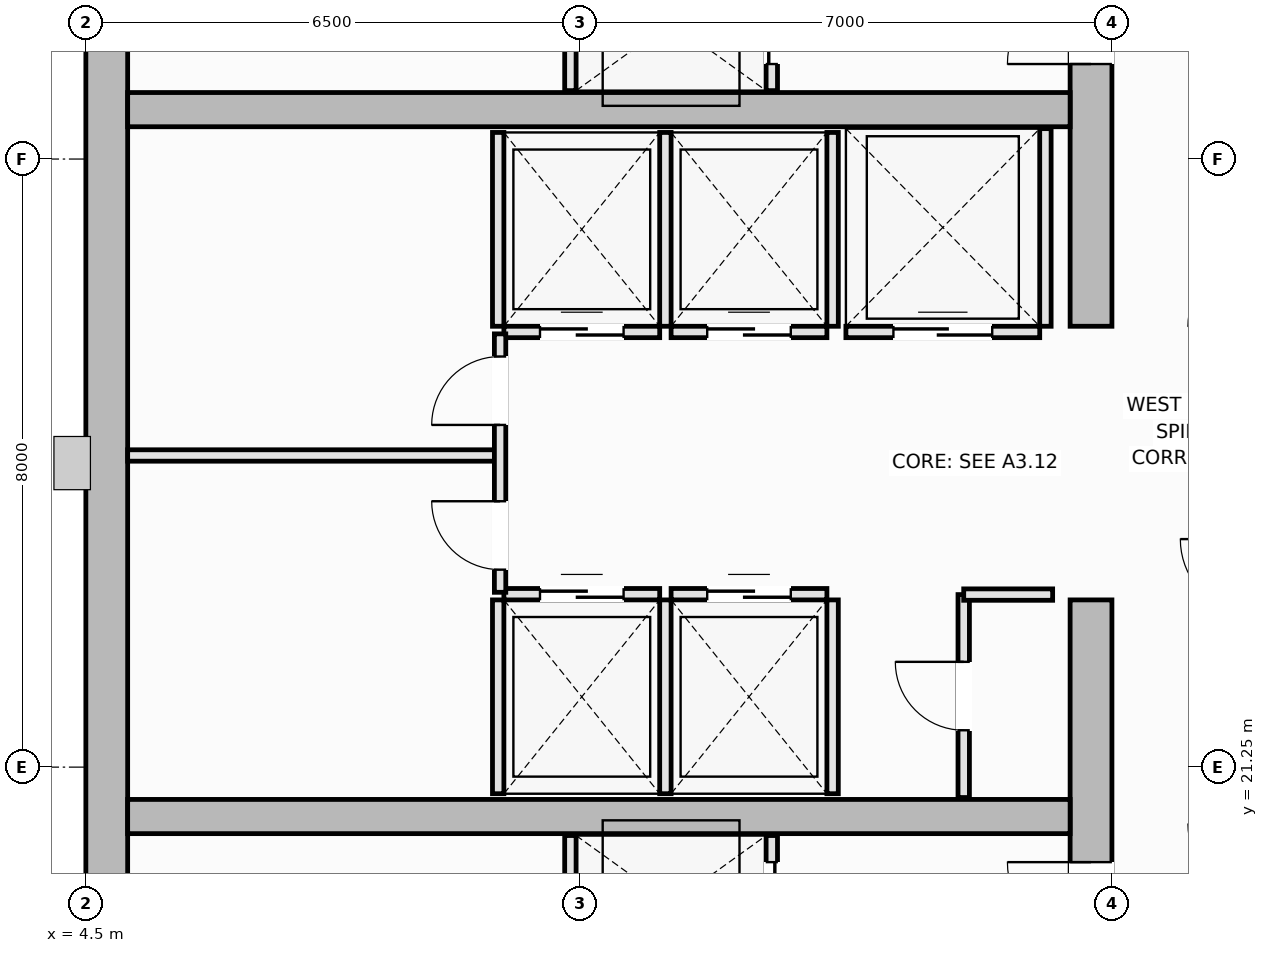
"""IFC4 building model, lengths in metres.
Left out: names, types, materials, properties, quantities, classifications, styles, units other than length and angle.
Written with IfcOpenShell. Run it as: python <this file> out.ifc"""

import sys

from ifc_helpers import new_model, si_unit, direction, frame, frame_2d, origin, place, context, subcontext, project, spatial, rectangle, extrude, element, fill, save


model = new_model("IFC4")
c1 = context("Model", 3, precision=1e-05, world=origin(), true_north=direction((0.0, 1.0)))
c2 = subcontext(c1, "Body", "Model", "MODEL_VIEW")
j1 = project(units=[si_unit("LENGTHUNIT", "METRE"), si_unit("PLANEANGLEUNIT", "RADIAN")], contexts=[c1])
p1 = place(None, origin())
s1 = spatial("IfcSite", under=j1, at=p1, CompositionType="ELEMENT")
p2 = place(p1, origin())
s2 = spatial("IfcBuilding", under=s1, at=p2, CompositionType="ELEMENT")
p3 = place(p2, frame((0.0, 0.0, 234.2)))
s3 = spatial("IfcBuildingStorey", under=s2, at=p3, CompositionType="ELEMENT", Elevation=234.2)
p4 = place(p3, frame((4.775, 14.55, 0.0), z_axis=(0.0, 0.0, 1.0), x_axis=(0.0, 1.0, 0.0)))
e1 = element("IfcWall", 1, at=p4, inside=s3, PredefinedType="SHEAR", context=c2, shape_type="SweptSolid", body=[
    extrude(rectangle(XDim=21.4, YDim=0.55, at=frame_2d((10.7, 0.0))), origin(), (0.0, 0.0, 1.0), 3.55),
])
p5 = place(p3, frame((17.725, 14.55, 0.0), z_axis=(0.0, 0.0, 1.0), x_axis=(0.0, 1.0, 0.0)))
e2 = element("IfcWall", 2, at=p5, inside=s3, PredefinedType="SHEAR", context=c2, shape_type="SweptSolid", body=[
    extrude(rectangle(XDim=8.9, YDim=0.55, at=frame_2d((4.45, 0.0))), origin(), (0.0, 0.0, 1.0), 3.55),
])
p6 = place(p5, frame((4.35, 0.0, 0.0)))
e3 = element("IfcOpeningElement", 3, at=p6, cuts=e2, PredefinedType="OPENING", context=c2, shape_type="SweptSolid", body=[
    extrude(rectangle(XDim=1.1, YDim=2.15, at=frame_2d((0.55, 1.075))), frame((0.0, 0.285, 0.0), z_axis=(0.0, -1.0, 0.0), x_axis=(1.0, 0.0, 0.0)), (0.0, 0.0, 1.0), 0.57),
])
p7 = place(p3, frame((17.725, 27.05, 0.0), z_axis=(0.0, 0.0, 1.0), x_axis=(0.0, 1.0, 0.0)))
e4 = element("IfcWall", 4, at=p7, inside=s3, PredefinedType="SHEAR", context=c2, shape_type="SweptSolid", body=[
    extrude(rectangle(XDim=8.9, YDim=0.55, at=frame_2d((4.45, 0.0))), origin(), (0.0, 0.0, 1.0), 3.55),
])
p8 = place(p7, frame((3.45, 0.0, 0.0)))
e5 = element("IfcOpeningElement", 5, at=p8, cuts=e4, PredefinedType="OPENING", context=c2, shape_type="SweptSolid", body=[
    extrude(rectangle(XDim=1.1, YDim=2.15, at=frame_2d((0.55, 1.075))), frame((0.0, 0.285, 0.0), z_axis=(0.0, -1.0, 0.0), x_axis=(1.0, 0.0, 0.0)), (0.0, 0.0, 1.0), 0.57),
])
for number, where, z_axis, x_axis in (
    (6, (5.05, 20.6, 0.0), (0.0, 0.0, 1.0), (1.0, 0.0, 0.0)),
    (7, (5.05, 29.9, 0.0), (0.0, 0.0, 1.0), (1.0, 0.0, 0.0)),
):
    element("IfcWall", number, at=place(p3, frame(where, z_axis=z_axis, x_axis=x_axis)), inside=s3, PredefinedType="SHEAR", context=c2, shape_type="SweptSolid", body=[
        extrude(rectangle(XDim=12.4, YDim=0.45, at=frame_2d((6.2, 0.0))), origin(), (0.0, 0.0, 1.0), 3.55),
    ])
p9 = place(p3, frame((10.0, 23.525, 0.0), z_axis=(0.0, 0.0, 1.0), x_axis=(1.0, 0.0, 0.0)))
e8 = element("IfcWall", 8, at=p9, inside=s3, PredefinedType="PARTITIONING", context=c2, shape_type="SweptSolid", body=[
    extrude(rectangle(XDim=2.05, YDim=0.15, at=frame_2d((1.025, 0.0))), origin(), (0.0, 0.0, 1.0), 3.37),
])
p10 = place(p9, frame((0.475, 0.0, 0.0)))
e9 = element("IfcOpeningElement", 9, at=p10, cuts=e8, PredefinedType="OPENING", context=c2, shape_type="SweptSolid", body=[
    extrude(rectangle(XDim=1.1, YDim=2.2, at=frame_2d((0.55, 1.1))), frame((0.0, 0.085, 0.0), z_axis=(0.0, -1.0, 0.0), x_axis=(1.0, 0.0, 0.0)), (0.0, 0.0, 1.0), 0.17),
])
for number, where, z_axis, x_axis in (
    (10, (9.925, 20.9, 0.0), (0.0, 0.0, 1.0), (0.0, 1.0, 0.0)),
    (11, (12.125, 20.9, 0.0), (0.0, 0.0, 1.0), (0.0, 1.0, 0.0)),
):
    element("IfcWall", number, at=place(p3, frame(where, z_axis=z_axis, x_axis=x_axis)), inside=s3, PredefinedType="PARTITIONING", context=c2, shape_type="SweptSolid", body=[
        extrude(rectangle(XDim=2.55, YDim=0.15, at=frame_2d((1.275, 0.0))), origin(), (0.0, 0.0, 1.0), 3.37),
    ])
p11 = place(p3, frame((12.2, 23.525, 0.0), z_axis=(0.0, 0.0, 1.0), x_axis=(1.0, 0.0, 0.0)))
e12 = element("IfcWall", 12, at=p11, inside=s3, PredefinedType="PARTITIONING", context=c2, shape_type="SweptSolid", body=[
    extrude(rectangle(XDim=2.05, YDim=0.15, at=frame_2d((1.025, 0.0))), origin(), (0.0, 0.0, 1.0), 3.37),
])
p12 = place(p11, frame((0.475, 0.0, 0.0)))
e13 = element("IfcOpeningElement", 13, at=p12, cuts=e12, PredefinedType="OPENING", context=c2, shape_type="SweptSolid", body=[
    extrude(rectangle(XDim=1.1, YDim=2.2, at=frame_2d((0.55, 1.1))), frame((0.0, 0.085, 0.0), z_axis=(0.0, -1.0, 0.0), x_axis=(1.0, 0.0, 0.0)), (0.0, 0.0, 1.0), 0.17),
])
p13 = place(p3, frame((14.325, 20.9, 0.0), z_axis=(0.0, 0.0, 1.0), x_axis=(0.0, 1.0, 0.0)))
e14 = element("IfcWall", 14, at=p13, inside=s3, PredefinedType="PARTITIONING", context=c2, shape_type="SweptSolid", body=[
    extrude(rectangle(XDim=2.55, YDim=0.15, at=frame_2d((1.275, 0.0))), origin(), (0.0, 0.0, 1.0), 3.37),
])
p14 = place(p3, frame((10.0, 26.975, 0.0), z_axis=(0.0, 0.0, 1.0), x_axis=(1.0, 0.0, 0.0)))
e15 = element("IfcWall", 15, at=p14, inside=s3, PredefinedType="PARTITIONING", context=c2, shape_type="SweptSolid", body=[
    extrude(rectangle(XDim=2.05, YDim=0.15, at=frame_2d((1.025, 0.0))), origin(), (0.0, 0.0, 1.0), 3.37),
])
p15 = place(p14, frame((0.475, 0.0, 0.0)))
e16 = element("IfcOpeningElement", 16, at=p15, cuts=e15, PredefinedType="OPENING", context=c2, shape_type="SweptSolid", body=[
    extrude(rectangle(XDim=1.1, YDim=2.2, at=frame_2d((0.55, 1.1))), frame((0.0, 0.085, 0.0), z_axis=(0.0, -1.0, 0.0), x_axis=(1.0, 0.0, 0.0)), (0.0, 0.0, 1.0), 0.17),
])
for number, where, z_axis, x_axis in (
    (17, (9.925, 27.05, 0.0), (0.0, 0.0, 1.0), (0.0, 1.0, 0.0)),
    (18, (12.125, 27.05, 0.0), (0.0, 0.0, 1.0), (0.0, 1.0, 0.0)),
):
    element("IfcWall", number, at=place(p3, frame(where, z_axis=z_axis, x_axis=x_axis)), inside=s3, PredefinedType="PARTITIONING", context=c2, shape_type="SweptSolid", body=[
        extrude(rectangle(XDim=2.55, YDim=0.15, at=frame_2d((1.275, 0.0))), origin(), (0.0, 0.0, 1.0), 3.37),
    ])
p16 = place(p3, frame((12.2, 26.975, 0.0), z_axis=(0.0, 0.0, 1.0), x_axis=(1.0, 0.0, 0.0)))
e19 = element("IfcWall", 19, at=p16, inside=s3, PredefinedType="PARTITIONING", context=c2, shape_type="SweptSolid", body=[
    extrude(rectangle(XDim=2.05, YDim=0.15, at=frame_2d((1.025, 0.0))), origin(), (0.0, 0.0, 1.0), 3.37),
])
p17 = place(p16, frame((0.475, 0.0, 0.0)))
e20 = element("IfcOpeningElement", 20, at=p17, cuts=e19, PredefinedType="OPENING", context=c2, shape_type="SweptSolid", body=[
    extrude(rectangle(XDim=1.1, YDim=2.2, at=frame_2d((0.55, 1.1))), frame((0.0, 0.085, 0.0), z_axis=(0.0, -1.0, 0.0), x_axis=(1.0, 0.0, 0.0)), (0.0, 0.0, 1.0), 0.17),
])
p18 = place(p3, frame((14.325, 27.05, 0.0), z_axis=(0.0, 0.0, 1.0), x_axis=(0.0, 1.0, 0.0)))
e21 = element("IfcWall", 21, at=p18, inside=s3, PredefinedType="PARTITIONING", context=c2, shape_type="SweptSolid", body=[
    extrude(rectangle(XDim=2.55, YDim=0.15, at=frame_2d((1.275, 0.0))), origin(), (0.0, 0.0, 1.0), 3.37),
])
p19 = place(p3, frame((14.5, 26.975, 0.0), z_axis=(0.0, 0.0, 1.0), x_axis=(1.0, 0.0, 0.0)))
e22 = element("IfcWall", 22, at=p19, inside=s3, PredefinedType="PARTITIONING", context=c2, shape_type="SweptSolid", body=[
    extrude(rectangle(XDim=2.55, YDim=0.15, at=frame_2d((1.275, 0.0))), origin(), (0.0, 0.0, 1.0), 3.37),
])
p20 = place(p19, frame((0.625, 0.0, 0.0)))
e23 = element("IfcOpeningElement", 23, at=p20, cuts=e22, PredefinedType="OPENING", context=c2, shape_type="SweptSolid", body=[
    extrude(rectangle(XDim=1.3, YDim=2.2, at=frame_2d((0.65, 1.1))), frame((0.0, 0.085, 0.0), z_axis=(0.0, -1.0, 0.0), x_axis=(1.0, 0.0, 0.0)), (0.0, 0.0, 1.0), 0.17),
])
p21 = place(p3, frame((17.125, 27.05, 0.0), z_axis=(0.0, 0.0, 1.0), x_axis=(0.0, 1.0, 0.0)))
e24 = element("IfcWall", 24, at=p21, inside=s3, PredefinedType="PARTITIONING", context=c2, shape_type="SweptSolid", body=[
    extrude(rectangle(XDim=2.6, YDim=0.15, at=frame_2d((1.3, 0.0))), origin(), (0.0, 0.0, 1.0), 3.37),
])
p22 = place(p3, frame((10.875, 18.55, 0.0), z_axis=(0.0, 0.0, 1.0), x_axis=(0.0, 1.0, 0.0)))
e25 = element("IfcWall", 25, at=p22, inside=s3, PredefinedType="PARTITIONING", context=c2, shape_type="SweptSolid", body=[
    extrude(rectangle(XDim=1.8, YDim=0.15, at=frame_2d((0.9, 0.0))), origin(), (0.0, 0.0, 1.0), 3.37),
])
p23 = place(p3, frame((13.525, 18.55, 0.0), z_axis=(0.0, 0.0, 1.0), x_axis=(0.0, 1.0, 0.0)))
e26 = element("IfcWall", 26, at=p23, inside=s3, PredefinedType="PARTITIONING", context=c2, shape_type="SweptSolid", body=[
    extrude(rectangle(XDim=1.8, YDim=0.15, at=frame_2d((0.9, 0.0))), origin(), (0.0, 0.0, 1.0), 3.37),
])
p24 = place(p23, frame((0.35, 0.0, 0.0)))
e27 = element("IfcOpeningElement", 27, at=p24, cuts=e26, PredefinedType="OPENING", context=c2, shape_type="SweptSolid", body=[
    extrude(rectangle(XDim=1.1, YDim=2.2, at=frame_2d((0.55, 1.1))), frame((0.0, 0.085, 0.0), z_axis=(0.0, -1.0, 0.0), x_axis=(1.0, 0.0, 0.0)), (0.0, 0.0, 1.0), 0.17),
])
p25 = place(p3, frame((10.875, 30.15, 0.0), z_axis=(0.0, 0.0, 1.0), x_axis=(0.0, 1.0, 0.0)))
e28 = element("IfcWall", 28, at=p25, inside=s3, PredefinedType="PARTITIONING", context=c2, shape_type="SweptSolid", body=[
    extrude(rectangle(XDim=1.8, YDim=0.15, at=frame_2d((0.9, 0.0))), origin(), (0.0, 0.0, 1.0), 3.37),
])
p26 = place(p3, frame((13.525, 30.15, 0.0), z_axis=(0.0, 0.0, 1.0), x_axis=(0.0, 1.0, 0.0)))
e29 = element("IfcWall", 29, at=p26, inside=s3, PredefinedType="PARTITIONING", context=c2, shape_type="SweptSolid", body=[
    extrude(rectangle(XDim=1.8, YDim=0.15, at=frame_2d((0.9, 0.0))), origin(), (0.0, 0.0, 1.0), 3.37),
])
p27 = place(p26, frame((0.35, 0.0, 0.0)))
e30 = element("IfcOpeningElement", 30, at=p27, cuts=e29, PredefinedType="OPENING", context=c2, shape_type="SweptSolid", body=[
    extrude(rectangle(XDim=1.1, YDim=2.2, at=frame_2d((0.55, 1.1))), frame((0.0, 0.085, 0.0), z_axis=(0.0, -1.0, 0.0), x_axis=(1.0, 0.0, 0.0)), (0.0, 0.0, 1.0), 0.17),
])
p28 = place(p3, frame((5.05, 25.35, 0.0), z_axis=(0.0, 0.0, 1.0), x_axis=(1.0, 0.0, 0.0)))
e31 = element("IfcWall", 31, at=p28, inside=s3, PredefinedType="PARTITIONING", context=c2, shape_type="SweptSolid", body=[
    extrude(rectangle(XDim=4.9, YDim=0.15, at=frame_2d((2.45, 0.0))), origin(), (0.0, 0.0, 1.0), 3.37),
])
p29 = place(p3, frame((9.95, 23.55, 0.0), z_axis=(0.0, 0.0, 1.0), x_axis=(0.0, 1.0, 0.0)))
e32 = element("IfcWall", 32, at=p29, inside=s3, PredefinedType="PARTITIONING", context=c2, shape_type="SweptSolid", body=[
    extrude(rectangle(XDim=3.4, YDim=0.15, at=frame_2d((1.7, 0.0))), origin(), (0.0, 0.0, 1.0), 3.37),
])
p30 = place(p29, frame((0.298, 0.0, 0.0)))
e33 = element("IfcOpeningElement", 33, at=p30, cuts=e32, PredefinedType="OPENING", context=c2, shape_type="SweptSolid", body=[
    extrude(rectangle(XDim=0.9, YDim=2.1, at=frame_2d((0.45, 1.05))), frame((0.0, 0.085, 0.0), z_axis=(0.0, -1.0, 0.0), x_axis=(1.0, 0.0, 0.0)), (0.0, 0.0, 1.0), 0.17),
])
p31 = place(p29, frame((2.202, 0.0, 0.0)))
e34 = element("IfcOpeningElement", 34, at=p31, cuts=e32, PredefinedType="OPENING", context=c2, shape_type="SweptSolid", body=[
    extrude(rectangle(XDim=0.9, YDim=2.1, at=frame_2d((0.45, 1.05))), frame((0.0, 0.085, 0.0), z_axis=(0.0, -1.0, 0.0), x_axis=(1.0, 0.0, 0.0)), (0.0, 0.0, 1.0), 0.17),
])
p32 = place(p3, frame((16.05, 20.85, 0.0), z_axis=(0.0, 0.0, 1.0), x_axis=(0.0, 1.0, 0.0)))
e35 = element("IfcWall", 35, at=p32, inside=s3, PredefinedType="PARTITIONING", context=c2, shape_type="SweptSolid", body=[
    extrude(rectangle(XDim=2.67, YDim=0.15, at=frame_2d((1.335, 0.0))), origin(), (0.0, 0.0, 1.0), 3.37),
])
p33 = place(p32, frame((0.885, 0.0, 0.0)))
e36 = element("IfcOpeningElement", 36, at=p33, cuts=e35, PredefinedType="OPENING", context=c2, shape_type="SweptSolid", body=[
    extrude(rectangle(XDim=0.9, YDim=2.1, at=frame_2d((0.45, 1.05))), frame((0.0, 0.085, 0.0), z_axis=(0.0, -1.0, 0.0), x_axis=(1.0, 0.0, 0.0)), (0.0, 0.0, 1.0), 0.17),
])
p34 = place(p3, frame((16.05, 23.52, 0.0), z_axis=(0.0, 0.0, 1.0), x_axis=(1.0, 0.0, 0.0)))
e37 = element("IfcWall", 37, at=p34, inside=s3, PredefinedType="PARTITIONING", context=c2, shape_type="SweptSolid", body=[
    extrude(rectangle(XDim=1.17, YDim=0.15, at=frame_2d((0.585, 0.0))), origin(), (0.0, 0.0, 1.0), 3.37),
])
p35 = place(p10, origin())
e38 = element("IfcDoor", 38, at=p35, inside=s3, OperationType="DOUBLE_DOOR_SLIDING", PredefinedType="DOOR", context=c2, shape_type="SweptSolid", body=[
    extrude(rectangle(XDim=1.1, YDim=2.2, at=frame_2d((0.55, 1.1))), frame((0.0, 0.025, 0.0), z_axis=(0.0, -1.0, 0.0), x_axis=(1.0, 0.0, 0.0)), (0.0, 0.0, 1.0), 0.05),
])
fill(e9, e38)
p36 = place(p12, origin())
e39 = element("IfcDoor", 39, at=p36, inside=s3, OperationType="DOUBLE_DOOR_SLIDING", PredefinedType="DOOR", context=c2, shape_type="SweptSolid", body=[
    extrude(rectangle(XDim=1.1, YDim=2.2, at=frame_2d((0.55, 1.1))), frame((0.0, 0.025, 0.0), z_axis=(0.0, -1.0, 0.0), x_axis=(1.0, 0.0, 0.0)), (0.0, 0.0, 1.0), 0.05),
])
fill(e13, e39)
p37 = place(p15, origin())
e40 = element("IfcDoor", 40, at=p37, inside=s3, OperationType="DOUBLE_DOOR_SLIDING", PredefinedType="DOOR", context=c2, shape_type="SweptSolid", body=[
    extrude(rectangle(XDim=1.1, YDim=2.2, at=frame_2d((0.55, 1.1))), frame((0.0, 0.025, 0.0), z_axis=(0.0, -1.0, 0.0), x_axis=(1.0, 0.0, 0.0)), (0.0, 0.0, 1.0), 0.05),
])
fill(e16, e40)
p38 = place(p17, origin())
e41 = element("IfcDoor", 41, at=p38, inside=s3, OperationType="DOUBLE_DOOR_SLIDING", PredefinedType="DOOR", context=c2, shape_type="SweptSolid", body=[
    extrude(rectangle(XDim=1.1, YDim=2.2, at=frame_2d((0.55, 1.1))), frame((0.0, 0.025, 0.0), z_axis=(0.0, -1.0, 0.0), x_axis=(1.0, 0.0, 0.0)), (0.0, 0.0, 1.0), 0.05),
])
fill(e20, e41)
p39 = place(p20, origin())
e42 = element("IfcDoor", 42, at=p39, inside=s3, OperationType="DOUBLE_DOOR_SLIDING", PredefinedType="DOOR", context=c2, shape_type="SweptSolid", body=[
    extrude(rectangle(XDim=1.3, YDim=2.2, at=frame_2d((0.65, 1.1))), frame((0.0, 0.025, 0.0), z_axis=(0.0, -1.0, 0.0), x_axis=(1.0, 0.0, 0.0)), (0.0, 0.0, 1.0), 0.05),
])
fill(e23, e42)
p40 = place(p24, origin())
e43 = element("IfcDoor", 43, at=p40, inside=s3, OperationType="DOUBLE_DOOR_SLIDING", PredefinedType="DOOR", context=c2, shape_type="SweptSolid", body=[
    extrude(rectangle(XDim=1.1, YDim=2.2, at=frame_2d((0.55, 1.1))), frame((0.0, 0.025, 0.0), z_axis=(0.0, -1.0, 0.0), x_axis=(1.0, 0.0, 0.0)), (0.0, 0.0, 1.0), 0.05),
])
fill(e27, e43)
p41 = place(p27, origin())
e44 = element("IfcDoor", 44, at=p41, inside=s3, OperationType="DOUBLE_DOOR_SLIDING", PredefinedType="DOOR", context=c2, shape_type="SweptSolid", body=[
    extrude(rectangle(XDim=1.1, YDim=2.2, at=frame_2d((0.55, 1.1))), frame((0.0, 0.025, 0.0), z_axis=(0.0, -1.0, 0.0), x_axis=(1.0, 0.0, 0.0)), (0.0, 0.0, 1.0), 0.05),
])
fill(e30, e44)
p42 = place(p6, origin())
e45 = element("IfcDoor", 45, at=p42, inside=s3, OperationType="SINGLE_SWING_RIGHT", PredefinedType="DOOR", context=c2, shape_type="SweptSolid", body=[
    extrude(rectangle(XDim=1.1, YDim=2.15, at=frame_2d((0.55, 1.075))), frame((0.0, 0.025, 0.0), z_axis=(0.0, -1.0, 0.0), x_axis=(1.0, 0.0, 0.0)), (0.0, 0.0, 1.0), 0.05),
])
fill(e3, e45)
p43 = place(p8, origin())
e46 = element("IfcDoor", 46, at=p43, inside=s3, OperationType="SINGLE_SWING_LEFT", PredefinedType="DOOR", context=c2, shape_type="SweptSolid", body=[
    extrude(rectangle(XDim=1.1, YDim=2.15, at=frame_2d((0.55, 1.075))), frame((0.0, 0.025, 0.0), z_axis=(0.0, -1.0, 0.0), x_axis=(1.0, 0.0, 0.0)), (0.0, 0.0, 1.0), 0.05),
])
fill(e5, e46)
p44 = place(p30, origin())
e47 = element("IfcDoor", 47, at=p44, inside=s3, OperationType="SINGLE_SWING_RIGHT", PredefinedType="DOOR", context=c2, shape_type="SweptSolid", body=[
    extrude(rectangle(XDim=0.9, YDim=2.1, at=frame_2d((0.45, 1.05))), frame((0.0, 0.025, 0.0), z_axis=(0.0, -1.0, 0.0), x_axis=(1.0, 0.0, 0.0)), (0.0, 0.0, 1.0), 0.05),
])
fill(e33, e47)
p45 = place(p31, origin())
e48 = element("IfcDoor", 48, at=p45, inside=s3, OperationType="SINGLE_SWING_LEFT", PredefinedType="DOOR", context=c2, shape_type="SweptSolid", body=[
    extrude(rectangle(XDim=0.9, YDim=2.1, at=frame_2d((0.45, 1.05))), frame((0.0, 0.025, 0.0), z_axis=(0.0, -1.0, 0.0), x_axis=(1.0, 0.0, 0.0)), (0.0, 0.0, 1.0), 0.05),
])
fill(e34, e48)
p46 = place(p33, origin())
e49 = element("IfcDoor", 49, at=p46, inside=s3, OperationType="SINGLE_SWING_RIGHT", PredefinedType="DOOR", context=c2, shape_type="SweptSolid", body=[
    extrude(rectangle(XDim=0.9, YDim=2.1, at=frame_2d((0.45, 1.05))), frame((0.0, 0.025, 0.0), z_axis=(0.0, -1.0, 0.0), x_axis=(1.0, 0.0, 0.0)), (0.0, 0.0, 1.0), 0.05),
])
fill(e36, e49)
save(model, sys.argv[1])
